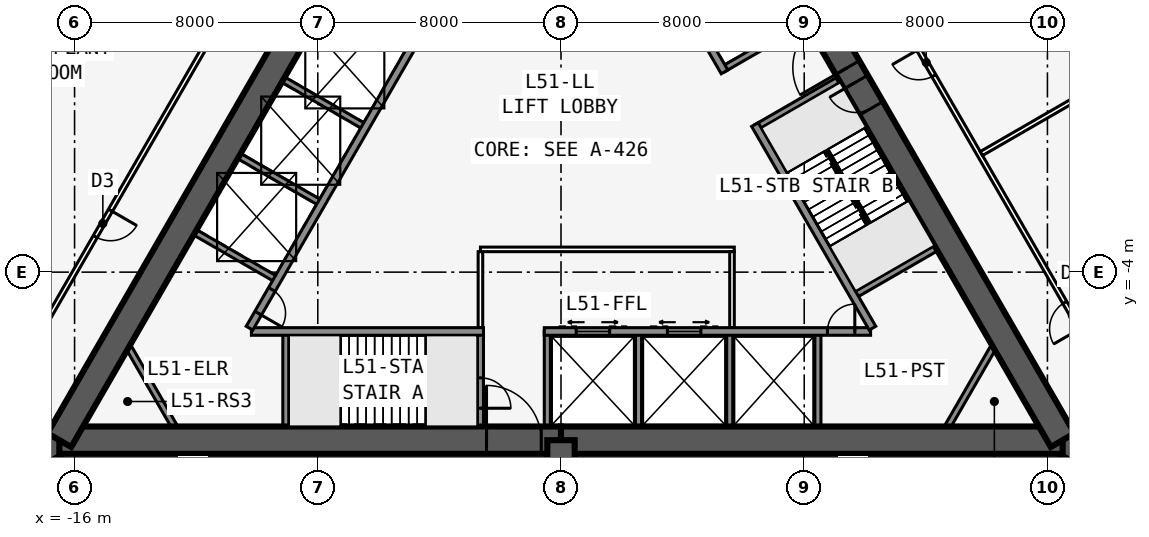
"""IFC4 building model, lengths in metres.
Left out: names, types, materials, properties, quantities, classifications, styles, units other than length and angle.
Written with IfcOpenShell. Run it as: python <this file> out.ifc"""

import sys

from ifc_helpers import new_model, si_unit, direction, frame, frame_2d, origin, place, context, subcontext, project, spatial, rectangle, extrude, element, fill, save


model = new_model("IFC4")
c1 = context("Model", 3, precision=1e-05, world=origin(), true_north=direction((0.0, 1.0)))
c2 = subcontext(c1, "Body", "Model", "MODEL_VIEW")
j1 = project(units=[si_unit("LENGTHUNIT", "METRE"), si_unit("PLANEANGLEUNIT", "RADIAN")], contexts=[c1])
p1 = place(None, origin())
s1 = spatial("IfcSite", under=j1, at=p1, CompositionType="ELEMENT")
p2 = place(p1, origin())
s2 = spatial("IfcBuilding", under=s1, at=p2, CompositionType="ELEMENT")
p3 = place(p2, frame((0.0, 0.0, 189.5)))
s3 = spatial("IfcBuildingStorey", under=s2, at=p3, CompositionType="ELEMENT", Elevation=189.5)
p4 = place(p3, frame((-16.5, -9.526, 0.0), z_axis=(0.0, 0.0, 1.0), x_axis=(1.0, 0.0, 0.0)))
e1 = element("IfcWall", 1, at=p4, inside=s3, PredefinedType="SHEAR", context=c2, shape_type="SweptSolid", body=[
    extrude(rectangle(XDim=16.5, YDim=0.9, at=frame_2d((8.25, 0.0))), origin(), (0.0, 0.0, 1.0), 6.4),
])
p5 = place(p4, frame((14.05, 0.0, 0.0)))
e2 = element("IfcOpeningElement", 2, at=p5, cuts=e1, PredefinedType="OPENING", context=c2, shape_type="SweptSolid", body=[
    extrude(rectangle(XDim=1.8, YDim=2.13, at=frame_2d((0.9, 1.065))), frame((0.0, 0.46, 0.0), z_axis=(0.0, -1.0, 0.0), x_axis=(1.0, 0.0, 0.0)), (0.0, 0.0, 1.0), 0.92),
])
p6 = place(p3, frame((0.0, -9.526, 0.0), z_axis=(0.0, 0.0, 1.0), x_axis=(1.0, 0.0, 0.0)))
e3 = element("IfcWall", 3, at=p6, inside=s3, PredefinedType="SHEAR", context=c2, shape_type="SweptSolid", body=[
    extrude(rectangle(XDim=16.5, YDim=0.9, at=frame_2d((8.25, 0.0))), origin(), (0.0, 0.0, 1.0), 6.4),
])
p7 = place(p3, frame((-10.183, -5.951, 0.0), z_axis=(0.0, 0.0, 1.0), x_axis=(1.0, 0.0, 0.0)))
e4 = element("IfcWall", 4, at=p7, inside=s3, PredefinedType="SOLIDWALL", context=c2, shape_type="SweptSolid", body=[
    extrude(rectangle(XDim=7.633, YDim=0.25, at=frame_2d((3.816, 0.0))), origin(), (0.0, 0.0, 1.0), 6.15),
])
p8 = place(p3, frame((-0.55, -5.951, 0.0), z_axis=(0.0, 0.0, 1.0), x_axis=(1.0, 0.0, 0.0)))
e5 = element("IfcWall", 5, at=p8, inside=s3, PredefinedType="SOLIDWALL", context=c2, shape_type="SweptSolid", body=[
    extrude(rectangle(XDim=10.733, YDim=0.25, at=frame_2d((5.366, 0.0))), origin(), (0.0, 0.0, 1.0), 6.15),
])
p9 = place(p8, frame((9.314, 0.0, 0.0)))
e6 = element("IfcOpeningElement", 6, at=p9, cuts=e5, PredefinedType="OPENING", context=c2, shape_type="SweptSolid", body=[
    extrude(rectangle(XDim=0.9, YDim=2.13, at=frame_2d((0.45, 1.065))), frame((0.0, 0.135, 0.0), z_axis=(0.0, -1.0, 0.0), x_axis=(1.0, 0.0, 0.0)), (0.0, 0.0, 1.0), 0.27),
])
p10 = place(p8, frame((1.05, 0.0, 0.0)))
e7 = element("IfcOpeningElement", 7, at=p10, cuts=e5, PredefinedType="OPENING", context=c2, shape_type="SweptSolid", body=[
    extrude(rectangle(XDim=1.1, YDim=2.13, at=frame_2d((0.55, 1.065))), frame((0.0, 0.135, 0.0), z_axis=(0.0, -1.0, 0.0), x_axis=(1.0, 0.0, 0.0)), (0.0, 0.0, 1.0), 0.27),
])
p11 = place(p8, frame((4.05, 0.0, 0.0)))
e8 = element("IfcOpeningElement", 8, at=p11, cuts=e5, PredefinedType="OPENING", context=c2, shape_type="SweptSolid", body=[
    extrude(rectangle(XDim=1.1, YDim=2.13, at=frame_2d((0.55, 1.065))), frame((0.0, 0.135, 0.0), z_axis=(0.0, -1.0, 0.0), x_axis=(1.0, 0.0, 0.0)), (0.0, 0.0, 1.0), 0.27),
])
p12 = place(p3, frame((-9.05, -5.951, 0.0), z_axis=(0.0, 0.0, 1.0), x_axis=(0.0, -1.0, 0.0)))
e9 = element("IfcWall", 9, at=p12, inside=s3, PredefinedType="SOLIDWALL", context=c2, shape_type="SweptSolid", body=[
    extrude(rectangle(XDim=3.125, YDim=0.2, at=frame_2d((1.562, 0.0))), origin(), (0.0, 0.0, 1.0), 6.15),
])
p13 = place(p3, frame((-2.65, -5.951, 0.0), z_axis=(0.0, 0.0, 1.0), x_axis=(0.0, -1.0, 0.0)))
e10 = element("IfcWall", 10, at=p13, inside=s3, PredefinedType="SOLIDWALL", context=c2, shape_type="SweptSolid", body=[
    extrude(rectangle(XDim=3.125, YDim=0.2, at=frame_2d((1.562, 0.0))), origin(), (0.0, 0.0, 1.0), 6.15),
])
p14 = place(p13, frame((1.525, 0.0, 0.0)))
e11 = element("IfcOpeningElement", 11, at=p14, cuts=e10, PredefinedType="OPENING", context=c2, shape_type="SweptSolid", body=[
    extrude(rectangle(XDim=1.0, YDim=2.13, at=frame_2d((0.5, 1.065))), frame((0.0, 0.11, 0.0), z_axis=(0.0, -1.0, 0.0), x_axis=(1.0, 0.0, 0.0)), (0.0, 0.0, 1.0), 0.22),
])
for number, where, z_axis, x_axis in (
    (12, (-0.45, -5.951, 0.0), (0.0, 0.0, 1.0), (0.0, -1.0, 0.0)),
    (13, (2.55, -5.951, 0.0), (0.0, 0.0, 1.0), (0.0, -1.0, 0.0)),
    (14, (5.55, -5.951, 0.0), (0.0, 0.0, 1.0), (0.0, -1.0, 0.0)),
    (15, (8.45, -5.951, 0.0), (0.0, 0.0, 1.0), (0.0, -1.0, 0.0)),
):
    element("IfcWall", number, at=place(p3, frame(where, z_axis=z_axis, x_axis=x_axis)), inside=s3, PredefinedType="SOLIDWALL", context=c2, shape_type="SweptSolid", body=[
        extrude(rectangle(XDim=3.125, YDim=0.2, at=frame_2d((1.562, 0.0))), origin(), (0.0, 0.0, 1.0), 6.15),
    ])
p15 = place(p3, frame((16.5, -9.526, 0.0), z_axis=(0.0, 0.0, 1.0), x_axis=(-0.499996545922, 0.866027397988, 0.0)))
e16 = element("IfcWall", 16, at=p15, inside=s3, PredefinedType="SHEAR", context=c2, shape_type="SweptSolid", body=[
    extrude(rectangle(XDim=16.5, YDim=0.9, at=frame_2d((8.25, 0.0))), origin(), (0.0, 0.0, 1.0), 6.4),
])
p16 = place(p15, frame((14.15, 0.0, 0.0)))
e17 = element("IfcOpeningElement", 17, at=p16, cuts=e16, PredefinedType="OPENING", context=c2, shape_type="SweptSolid", body=[
    extrude(rectangle(XDim=1.8, YDim=2.13, at=frame_2d((0.9, 1.065))), frame((0.0, 0.46, 0.0), z_axis=(0.0, -1.0, 0.0), x_axis=(1.0, 0.0, 0.0)), (0.0, 0.0, 1.0), 0.92),
])
p17 = place(p15, frame((12.6, 0.0, 0.0)))
e18 = element("IfcOpeningElement", 18, at=p17, cuts=e16, PredefinedType="OPENING", context=c2, shape_type="SweptSolid", body=[
    extrude(rectangle(XDim=1.0, YDim=2.13, at=frame_2d((0.5, 1.065))), frame((0.0, 0.46, 0.0), z_axis=(0.0, -1.0, 0.0), x_axis=(1.0, 0.0, 0.0)), (0.0, 0.0, 1.0), 0.92),
])
p18 = place(p3, frame((10.245, -5.843, 0.0), z_axis=(0.0, 0.0, 1.0), x_axis=(-0.499993009313, 0.866029439822, 0.0)))
e19 = element("IfcWall", 19, at=p18, inside=s3, PredefinedType="SOLIDWALL", context=c2, shape_type="SweptSolid", body=[
    extrude(rectangle(XDim=7.733, YDim=0.25, at=frame_2d((3.866, 0.0))), origin(), (0.0, 0.0, 1.0), 6.15),
])
p19 = place(p3, frame((5.379, 2.586, 0.0), z_axis=(0.0, 0.0, 1.0), x_axis=(-0.500001375892, 0.866024609411, 0.0)))
e20 = element("IfcWall", 20, at=p19, inside=s3, PredefinedType="SOLIDWALL", context=c2, shape_type="SweptSolid", body=[
    extrude(rectangle(XDim=10.633, YDim=0.25, at=frame_2d((5.316, 0.0))), origin(), (0.0, 0.0, 1.0), 6.15),
])
p20 = place(p19, frame((9.164, 0.0, 0.0)))
e21 = element("IfcOpeningElement", 21, at=p20, cuts=e20, PredefinedType="OPENING", context=c2, shape_type="SweptSolid", body=[
    extrude(rectangle(XDim=0.9, YDim=2.13, at=frame_2d((0.45, 1.065))), frame((0.0, 0.135, 0.0), z_axis=(0.0, -1.0, 0.0), x_axis=(1.0, 0.0, 0.0)), (0.0, 0.0, 1.0), 0.27),
])
for number, where, z_axis, x_axis in (
    (22, (9.629, -4.775, 0.0), (0.0, 0.0, 1.0), (0.866, 0.5, 0.0)),
    (23, (6.429, 0.767, 0.0), (0.0, 0.0, 1.0), (0.866, 0.5, 0.0)),
    (24, (5.329, 2.673, 0.0), (0.0, 0.0, 1.0), (0.866, 0.5, 0.0)),
):
    element("IfcWall", number, at=place(p3, frame(where, z_axis=z_axis, x_axis=x_axis)), inside=s3, PredefinedType="SOLIDWALL", context=c2, shape_type="SweptSolid", body=[
        extrude(rectangle(XDim=3.125, YDim=0.2, at=frame_2d((1.562, 0.0))), origin(), (0.0, 0.0, 1.0), 6.15),
    ])
p21 = place(p3, frame((-8.25, 4.763, 0.0), z_axis=(0.0, 0.0, 1.0), x_axis=(-0.499996545922, -0.866027397988, 0.0)))
e25 = element("IfcWall", 25, at=p21, inside=s3, PredefinedType="SHEAR", context=c2, shape_type="SweptSolid", body=[
    extrude(rectangle(XDim=16.5, YDim=0.9, at=frame_2d((8.25, 0.0))), origin(), (0.0, 0.0, 1.0), 6.4),
])
p22 = place(p3, frame((-4.929, 3.365, 0.0), z_axis=(0.0, 0.0, 1.0), x_axis=(-0.499991433582, -0.866030349552, 0.0)))
e26 = element("IfcWall", 26, at=p22, inside=s3, PredefinedType="SOLIDWALL", context=c2, shape_type="SweptSolid", body=[
    extrude(rectangle(XDim=10.633, YDim=0.25, at=frame_2d((5.316, 0.0))), origin(), (0.0, 0.0, 1.0), 6.15),
])
p23 = place(p22, frame((9.164, 0.0, 0.0)))
e27 = element("IfcOpeningElement", 27, at=p23, cuts=e26, PredefinedType="OPENING", context=c2, shape_type="SweptSolid", body=[
    extrude(rectangle(XDim=0.9, YDim=2.13, at=frame_2d((0.45, 1.065))), frame((0.0, 0.135, 0.0), z_axis=(0.0, -1.0, 0.0), x_axis=(1.0, 0.0, 0.0)), (0.0, 0.0, 1.0), 0.27),
])
for number, where, z_axis, x_axis in (
    (28, (-4.979, 3.279, 0.0), (0.0, 0.0, 1.0), (-0.866, 0.5, 0.0)),
    (29, (-6.429, 0.767, 0.0), (0.0, 0.0, 1.0), (-0.866, 0.5, 0.0)),
    (30, (-7.879, -1.744, 0.0), (0.0, 0.0, 1.0), (-0.866, 0.5, 0.0)),
    (31, (-9.329, -4.256, 0.0), (0.0, 0.0, 1.0), (-0.866, 0.5, 0.0)),
):
    element("IfcWall", number, at=place(p3, frame(where, z_axis=z_axis, x_axis=x_axis)), inside=s3, PredefinedType="SOLIDWALL", context=c2, shape_type="SweptSolid", body=[
        extrude(rectangle(XDim=3.125, YDim=0.2, at=frame_2d((1.562, 0.0))), origin(), (0.0, 0.0, 1.0), 6.15),
    ])
p24 = place(p3, frame((16.5, -9.526, 0.0), z_axis=(0.0, 0.0, 1.0), x_axis=(0.866031398331, -0.499989616998, 0.0)))
e32 = element("IfcWall", 32, at=p24, inside=s3, PredefinedType="SHEAR", context=c2, shape_type="SweptSolid", body=[
    extrude(rectangle(XDim=4.746, YDim=0.9, at=frame_2d((2.373, 0.0))), origin(), (0.0, 0.0, 1.0), 6.4),
])
p25 = place(p24, frame((1.8, 0.0, 0.0)))
e33 = element("IfcOpeningElement", 33, at=p25, cuts=e32, PredefinedType="OPENING", context=c2, shape_type="SweptSolid", body=[
    extrude(rectangle(XDim=1.8, YDim=2.13, at=frame_2d((0.9, 1.065))), frame((0.0, 0.46, 0.0), z_axis=(0.0, -1.0, 0.0), x_axis=(1.0, 0.0, 0.0)), (0.0, 0.0, 1.0), 0.92),
])
p26 = place(p3, frame((-16.5, -9.526, 0.0), z_axis=(0.0, 0.0, 1.0), x_axis=(-0.866031398331, -0.499989616998, 0.0)))
e34 = element("IfcWall", 34, at=p26, inside=s3, PredefinedType="SHEAR", context=c2, shape_type="SweptSolid", body=[
    extrude(rectangle(XDim=4.746, YDim=0.9, at=frame_2d((2.373, 0.0))), origin(), (0.0, 0.0, 1.0), 6.4),
])
p27 = place(p26, frame((1.8, 0.0, 0.0)))
e35 = element("IfcOpeningElement", 35, at=p27, cuts=e34, PredefinedType="OPENING", context=c2, shape_type="SweptSolid", body=[
    extrude(rectangle(XDim=1.8, YDim=2.13, at=frame_2d((0.9, 1.065))), frame((0.0, 0.46, 0.0), z_axis=(0.0, -1.0, 0.0), x_axis=(1.0, 0.0, 0.0)), (0.0, 0.0, 1.0), 0.92),
])
p28 = place(p3, frame((0.0, -9.526, 0.0), z_axis=(0.0, 0.0, 1.0), x_axis=(0.0, -1.0, 0.0)))
e36 = element("IfcWall", 36, at=p28, inside=s3, PredefinedType="SHEAR", context=c2, shape_type="SweptSolid", body=[
    extrude(rectangle(XDim=8.154, YDim=0.9, at=frame_2d((4.077, 0.0))), origin(), (0.0, 0.0, 1.0), 6.4),
])
p29 = place(p3, frame((20.027, -10.985, 0.0), z_axis=(0.0, 0.0, 1.0), x_axis=(-0.500001677587, 0.866024435227, 0.0)))
e37 = element("IfcWall", 37, at=p29, inside=s3, PredefinedType="PARTITIONING", context=c2, shape_type="SweptSolid", body=[
    extrude(rectangle(XDim=39.054, YDim=0.15, at=frame_2d((19.527, 0.0))), origin(), (0.0, 0.0, 1.0), 6.15),
])
p30 = place(p29, frame((5.914, 0.0, 0.0)))
e38 = element("IfcOpeningElement", 38, at=p30, cuts=e37, PredefinedType="OPENING", context=c2, shape_type="SweptSolid", body=[
    extrude(rectangle(XDim=1.0, YDim=2.13, at=frame_2d((0.5, 1.065))), frame((0.0, 0.085, 0.0), z_axis=(0.0, -1.0, 0.0), x_axis=(1.0, 0.0, 0.0)), (0.0, 0.0, 1.0), 0.17),
])
p31 = place(p29, frame((15.527, 0.0, 0.0)))
e39 = element("IfcOpeningElement", 39, at=p31, cuts=e37, PredefinedType="OPENING", context=c2, shape_type="SweptSolid", body=[
    extrude(rectangle(XDim=1.0, YDim=2.13, at=frame_2d((0.5, 1.065))), frame((0.0, 0.085, 0.0), z_axis=(0.0, -1.0, 0.0), x_axis=(1.0, 0.0, 0.0)), (0.0, 0.0, 1.0), 0.17),
])
p32 = place(p29, frame((22.027, 0.0, 0.0)))
e40 = element("IfcOpeningElement", 40, at=p32, cuts=e37, PredefinedType="OPENING", context=c2, shape_type="SweptSolid", body=[
    extrude(rectangle(XDim=1.0, YDim=2.13, at=frame_2d((0.5, 1.065))), frame((0.0, 0.085, 0.0), z_axis=(0.0, -1.0, 0.0), x_axis=(1.0, 0.0, 0.0)), (0.0, 0.0, 1.0), 0.17),
])
p33 = place(p29, frame((31.64, 0.0, 0.0)))
e41 = element("IfcOpeningElement", 41, at=p33, cuts=e37, PredefinedType="OPENING", context=c2, shape_type="SweptSolid", body=[
    extrude(rectangle(XDim=1.0, YDim=2.13, at=frame_2d((0.5, 1.065))), frame((0.0, 0.085, 0.0), z_axis=(0.0, -1.0, 0.0), x_axis=(1.0, 0.0, 0.0)), (0.0, 0.0, 1.0), 0.17),
])
p34 = place(p3, frame((13.829, -0.099, 0.0), z_axis=(0.0, 0.0, 1.0), x_axis=(0.866013391923, 0.500020804578, 0.0)))
e42 = element("IfcWall", 42, at=p34, inside=s3, PredefinedType="PARTITIONING", context=c2, shape_type="SweptSolid", body=[
    extrude(rectangle(XDim=8.713, YDim=0.15, at=frame_2d((4.356, 0.0))), origin(), (0.0, 0.0, 1.0), 6.15),
])
p35 = place(p3, frame((-0.5, 22.836, 0.0), z_axis=(0.0, 0.0, 1.0), x_axis=(-0.500001677587, -0.866024435227, 0.0)))
e43 = element("IfcWall", 43, at=p35, inside=s3, PredefinedType="PARTITIONING", context=c2, shape_type="SweptSolid", body=[
    extrude(rectangle(XDim=39.054, YDim=0.15, at=frame_2d((19.527, 0.0))), origin(), (0.0, 0.0, 1.0), 6.15),
])
p36 = place(p35, frame((7.914, 0.0, 0.0)))
e44 = element("IfcOpeningElement", 44, at=p36, cuts=e43, PredefinedType="OPENING", context=c2, shape_type="SweptSolid", body=[
    extrude(rectangle(XDim=1.0, YDim=2.13, at=frame_2d((0.5, 1.065))), frame((0.0, 0.085, 0.0), z_axis=(0.0, -1.0, 0.0), x_axis=(1.0, 0.0, 0.0)), (0.0, 0.0, 1.0), 0.17),
])
p37 = place(p35, frame((17.527, 0.0, 0.0)))
e45 = element("IfcOpeningElement", 45, at=p37, cuts=e43, PredefinedType="OPENING", context=c2, shape_type="SweptSolid", body=[
    extrude(rectangle(XDim=1.0, YDim=2.13, at=frame_2d((0.5, 1.065))), frame((0.0, 0.085, 0.0), z_axis=(0.0, -1.0, 0.0), x_axis=(1.0, 0.0, 0.0)), (0.0, 0.0, 1.0), 0.17),
])
p38 = place(p35, frame((28.64, 0.0, 0.0)))
e46 = element("IfcOpeningElement", 46, at=p38, cuts=e43, PredefinedType="OPENING", context=c2, shape_type="SweptSolid", body=[
    extrude(rectangle(XDim=1.0, YDim=2.13, at=frame_2d((0.5, 1.065))), frame((0.0, 0.085, 0.0), z_axis=(0.0, -1.0, 0.0), x_axis=(1.0, 0.0, 0.0)), (0.0, 0.0, 1.0), 0.17),
])
p39 = place(p3, frame((-2.65, -3.251, 0.0), z_axis=(0.0, 0.0, 1.0), x_axis=(1.0, 0.0, 0.0)))
e47 = element("IfcWall", 47, at=p39, inside=s3, PredefinedType="PARTITIONING", context=c2, shape_type="SweptSolid", body=[
    extrude(rectangle(XDim=8.35, YDim=0.15, at=frame_2d((4.175, 0.0))), origin(), (0.0, 0.0, 1.0), 6.15),
])
for number, where, z_axis, x_axis in (
    (48, (-2.65, -5.826, 0.0), (0.0, 0.0, 1.0), (0.0, 1.0, 0.0)),
    (49, (5.625, -5.826, 0.0), (0.0, 0.0, 1.0), (0.0, 1.0, 0.0)),
):
    element("IfcWall", number, at=place(p3, frame(where, z_axis=z_axis, x_axis=x_axis)), inside=s3, PredefinedType="PARTITIONING", context=c2, shape_type="SweptSolid", body=[
        extrude(rectangle(XDim=2.5, YDim=0.15, at=frame_2d((1.25, 0.0))), origin(), (0.0, 0.0, 1.0), 6.15),
    ])
for number, where, z_axis, x_axis in (
    (50, (14.219, -6.476, 0.0), (0.0, 0.0, 1.0), (-0.5, -0.866, 0.0)),
    (51, (-12.719, -9.076, 0.0), (0.0, 0.0, 1.0), (-0.5, 0.866, 0.0)),
):
    element("IfcWall", number, at=place(p3, frame(where, z_axis=z_axis, x_axis=x_axis)), inside=s3, PredefinedType="SOLIDWALL", context=c2, shape_type="SweptSolid", body=[
        extrude(rectangle(XDim=3.002, YDim=0.2, at=frame_2d((1.501, 0.0))), origin(), (0.0, 0.0, 1.0), 6.15),
    ])
p40 = place(p3, frame((-7.247, -7.576, 0.0), z_axis=(0.0, 0.0, 1.0), x_axis=(1.0, 0.0, 0.0)))
e52 = element("IfcWall", 52, at=p40, inside=s3, PredefinedType="SOLIDWALL", context=c2, shape_type="SweptSolid", body=[
    extrude(rectangle(XDim=2.794, YDim=0.1, at=frame_2d((1.397, 0.0))), origin(), (0.0, 0.0, 1.0), 6.4),
])
p41 = place(p3, frame((10.135, -2.401, 0.0), z_axis=(0.0, 0.0, 1.0), x_axis=(-0.499992232847, 0.866029888106, 0.0)))
e53 = element("IfcWall", 53, at=p41, inside=s3, PredefinedType="SOLIDWALL", context=c2, shape_type="SweptSolid", body=[
    extrude(rectangle(XDim=2.794, YDim=0.1, at=frame_2d((1.397, 0.0))), origin(), (0.0, 0.0, 1.0), 6.4),
])
p42 = place(p30, origin())
e54 = element("IfcDoor", 54, at=p42, inside=s3, OperationType="SINGLE_SWING_LEFT", PredefinedType="DOOR", context=c2, shape_type="SweptSolid", body=[
    extrude(rectangle(XDim=1.0, YDim=2.13, at=frame_2d((0.5, 1.065))), frame((0.0, 0.025, 0.0), z_axis=(0.0, -1.0, 0.0), x_axis=(1.0, 0.0, 0.0)), (0.0, 0.0, 1.0), 0.05),
])
fill(e38, e54)
p43 = place(p31, origin())
e55 = element("IfcDoor", 55, at=p43, inside=s3, OperationType="SINGLE_SWING_RIGHT", PredefinedType="DOOR", context=c2, shape_type="SweptSolid", body=[
    extrude(rectangle(XDim=1.0, YDim=2.13, at=frame_2d((0.5, 1.065))), frame((0.0, 0.025, 0.0), z_axis=(0.0, -1.0, 0.0), x_axis=(1.0, 0.0, 0.0)), (0.0, 0.0, 1.0), 0.05),
])
fill(e39, e55)
p44 = place(p38, origin())
e56 = element("IfcDoor", 56, at=p44, inside=s3, OperationType="SINGLE_SWING_LEFT", PredefinedType="DOOR", context=c2, shape_type="SweptSolid", body=[
    extrude(rectangle(XDim=1.0, YDim=2.13, at=frame_2d((0.5, 1.065))), frame((0.0, 0.025, 0.0), z_axis=(0.0, -1.0, 0.0), x_axis=(1.0, 0.0, 0.0)), (0.0, 0.0, 1.0), 0.05),
])
fill(e46, e56)
p45 = place(p5, origin())
e57 = element("IfcDoor", 57, at=p45, inside=s3, OperationType="DOUBLE_DOOR_SINGLE_SWING", PredefinedType="DOOR", context=c2, shape_type="SweptSolid", body=[
    extrude(rectangle(XDim=1.8, YDim=2.13, at=frame_2d((0.9, 1.065))), frame((0.0, 0.025, 0.0), z_axis=(0.0, -1.0, 0.0), x_axis=(1.0, 0.0, 0.0)), (0.0, 0.0, 1.0), 0.05),
])
fill(e2, e57)
p46 = place(p14, origin())
e58 = element("IfcDoor", 58, at=p46, inside=s3, OperationType="SINGLE_SWING_RIGHT", PredefinedType="DOOR", context=c2, shape_type="SweptSolid", body=[
    extrude(rectangle(XDim=1.0, YDim=2.13, at=frame_2d((0.5, 1.065))), frame((0.0, 0.025, 0.0), z_axis=(0.0, -1.0, 0.0), x_axis=(1.0, 0.0, 0.0)), (0.0, 0.0, 1.0), 0.05),
])
fill(e11, e58)
p47 = place(p16, origin())
e59 = element("IfcDoor", 59, at=p47, inside=s3, OperationType="DOUBLE_DOOR_SINGLE_SWING", PredefinedType="DOOR", context=c2, shape_type="SweptSolid", body=[
    extrude(rectangle(XDim=1.8, YDim=2.13, at=frame_2d((0.9, 1.065))), frame((0.0, 0.025, 0.0), z_axis=(0.0, -1.0, 0.0), x_axis=(1.0, 0.0, 0.0)), (0.0, 0.0, 1.0), 0.05),
])
fill(e17, e59)
p48 = place(p17, origin())
e60 = element("IfcDoor", 60, at=p48, inside=s3, OperationType="SINGLE_SWING_RIGHT", PredefinedType="DOOR", context=c2, shape_type="SweptSolid", body=[
    extrude(rectangle(XDim=1.0, YDim=2.13, at=frame_2d((0.5, 1.065))), frame((0.0, 0.025, 0.0), z_axis=(0.0, -1.0, 0.0), x_axis=(1.0, 0.0, 0.0)), (0.0, 0.0, 1.0), 0.05),
])
fill(e18, e60)
p49 = place(p9, origin())
e61 = element("IfcDoor", 61, at=p49, inside=s3, OperationType="SINGLE_SWING_RIGHT", PredefinedType="DOOR", context=c2, shape_type="SweptSolid", body=[
    extrude(rectangle(XDim=0.9, YDim=2.13, at=frame_2d((0.45, 1.065))), frame((0.0, 0.025, 0.0), z_axis=(0.0, -1.0, 0.0), x_axis=(1.0, 0.0, 0.0)), (0.0, 0.0, 1.0), 0.05),
])
fill(e6, e61)
p50 = place(p23, origin())
e62 = element("IfcDoor", 62, at=p50, inside=s3, OperationType="SINGLE_SWING_RIGHT", PredefinedType="DOOR", context=c2, shape_type="SweptSolid", body=[
    extrude(rectangle(XDim=0.9, YDim=2.13, at=frame_2d((0.45, 1.065))), frame((0.0, 0.025, 0.0), z_axis=(0.0, -1.0, 0.0), x_axis=(1.0, 0.0, 0.0)), (0.0, 0.0, 1.0), 0.05),
])
fill(e27, e62)
p51 = place(p10, origin())
e63 = element("IfcDoor", 63, at=p51, inside=s3, OperationType="DOUBLE_DOOR_SLIDING", PredefinedType="USERDEFINED", context=c2, shape_type="SweptSolid", body=[
    extrude(rectangle(XDim=1.1, YDim=2.13, at=frame_2d((0.55, 1.065))), frame((0.0, 0.025, 0.0), z_axis=(0.0, -1.0, 0.0), x_axis=(1.0, 0.0, 0.0)), (0.0, 0.0, 1.0), 0.05),
])
fill(e7, e63)
p52 = place(p11, origin())
e64 = element("IfcDoor", 64, at=p52, inside=s3, OperationType="DOUBLE_DOOR_SLIDING", PredefinedType="USERDEFINED", context=c2, shape_type="SweptSolid", body=[
    extrude(rectangle(XDim=1.1, YDim=2.13, at=frame_2d((0.55, 1.065))), frame((0.0, 0.025, 0.0), z_axis=(0.0, -1.0, 0.0), x_axis=(1.0, 0.0, 0.0)), (0.0, 0.0, 1.0), 0.05),
])
fill(e8, e64)
save(model, sys.argv[1])
